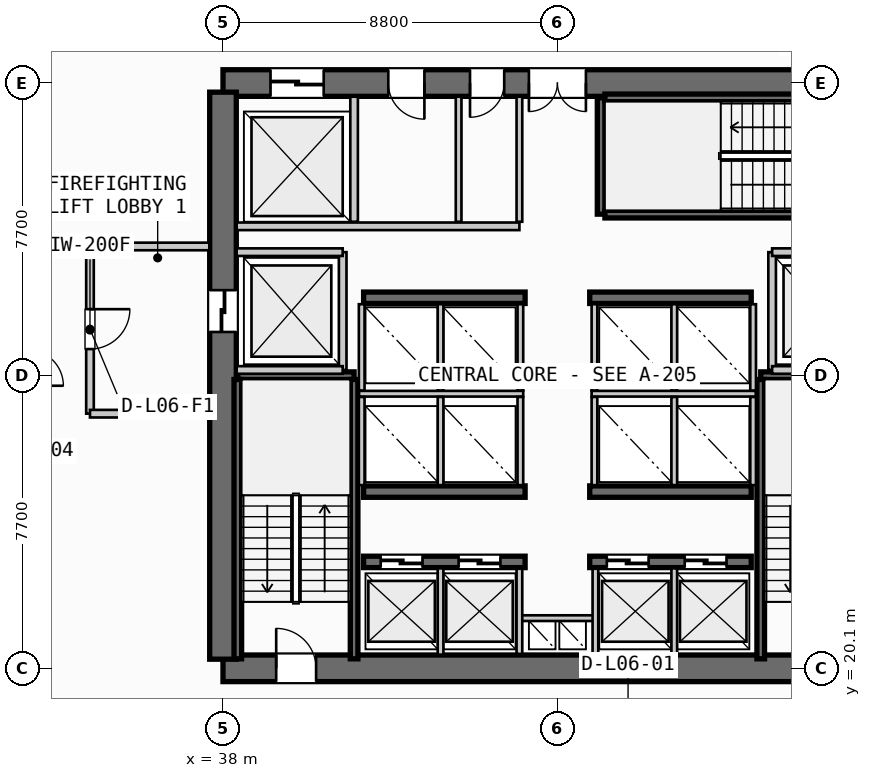
"""IFC4 building model, lengths in metres.
Left out: names, types, materials, properties, quantities, classifications, styles, units other than length and angle.
Written with IfcOpenShell. Run it as: python <this file> out.ifc"""

import sys

from ifc_helpers import new_model, si_unit, direction, frame, frame_2d, origin, place, context, subcontext, project, spatial, rectangle, extrude, source, transform, mapped, element, fill, save


model = new_model("IFC4")
c1 = context("Model", 3, precision=1e-05, world=origin(), true_north=direction((0.0, 1.0)))
c2 = subcontext(c1, "Body", "Model", "MODEL_VIEW")
j1 = project(units=[si_unit("LENGTHUNIT", "METRE"), si_unit("PLANEANGLEUNIT", "RADIAN")], contexts=[c1])
p1 = place(None, origin())
s1 = spatial("IfcSite", under=j1, at=p1, CompositionType="ELEMENT")
p2 = place(p1, origin())
s2 = spatial("IfcBuilding", under=s1, at=p2, CompositionType="ELEMENT")
p3 = place(p2, frame((0.0, 0.0, 29.6)))
s3 = spatial("IfcBuildingStorey", under=s2, at=p3, CompositionType="ELEMENT", Elevation=29.6)
p4 = place(p3, frame((38.0, 20.1, 0.0), z_axis=(0.0, 0.0, 1.0), x_axis=(1.0, 0.0, 0.0)))
e1 = element("IfcWall", 1, at=p4, inside=s3, PredefinedType="SHEAR", context=c2, shape_type="SweptSolid", body=[
    extrude(rectangle(XDim=17.6, YDim=0.7, at=frame_2d((8.8, 0.0))), origin(), (0.0, 0.0, 1.0), 3.55),
])
p5 = place(p4, frame((1.4, 0.0, 0.0)))
e2 = element("IfcOpeningElement", 2, at=p5, cuts=e1, PredefinedType="OPENING", context=c2, shape_type="SweptSolid", body=[
    extrude(rectangle(XDim=1.05, YDim=2.15, at=frame_2d((0.525, 1.075))), frame((0.0, 0.36, 0.0), z_axis=(0.0, -1.0, 0.0), x_axis=(1.0, 0.0, 0.0)), (0.0, 0.0, 1.0), 0.72),
])
p6 = place(p4, frame((15.15, 0.0, 0.0)))
e3 = element("IfcOpeningElement", 3, at=p6, cuts=e1, PredefinedType="OPENING", context=c2, shape_type="SweptSolid", body=[
    extrude(rectangle(XDim=1.05, YDim=2.15, at=frame_2d((0.525, 1.075))), frame((0.0, 0.36, 0.0), z_axis=(0.0, -1.0, 0.0), x_axis=(1.0, 0.0, 0.0)), (0.0, 0.0, 1.0), 0.72),
])
p7 = place(p3, frame((55.6, 35.5, 0.0), z_axis=(0.0, 0.0, 1.0), x_axis=(-1.0, 0.0, 0.0)))
e4 = element("IfcWall", 4, at=p7, inside=s3, PredefinedType="SHEAR", context=c2, shape_type="SweptSolid", body=[
    extrude(rectangle(XDim=17.6, YDim=0.7, at=frame_2d((8.8, 0.0))), origin(), (0.0, 0.0, 1.0), 3.55),
])
p8 = place(p7, frame((8.05, 0.0, 0.0)))
e5 = element("IfcOpeningElement", 5, at=p8, cuts=e4, PredefinedType="OPENING", context=c2, shape_type="SweptSolid", body=[
    extrude(rectangle(XDim=1.5, YDim=2.2, at=frame_2d((0.75, 1.1))), frame((0.0, 0.36, 0.0), z_axis=(0.0, -1.0, 0.0), x_axis=(1.0, 0.0, 0.0)), (0.0, 0.0, 1.0), 0.72),
])
p9 = place(p7, frame((14.95, 0.0, 0.0)))
e6 = element("IfcOpeningElement", 6, at=p9, cuts=e4, PredefinedType="OPENING", context=c2, shape_type="SweptSolid", body=[
    extrude(rectangle(XDim=1.4, YDim=2.3, at=frame_2d((0.7, 1.15))), frame((0.0, 0.36, 0.0), z_axis=(0.0, -1.0, 0.0), x_axis=(1.0, 0.0, 0.0)), (0.0, 0.0, 1.0), 0.72),
])
p10 = place(p7, frame((12.3, 0.0, 0.0)))
e7 = element("IfcOpeningElement", 7, at=p10, cuts=e4, PredefinedType="OPENING", context=c2, shape_type="SweptSolid", body=[
    extrude(rectangle(XDim=0.95, YDim=2.15, at=frame_2d((0.475, 1.075))), frame((0.0, 0.36, 0.0), z_axis=(0.0, -1.0, 0.0), x_axis=(1.0, 0.0, 0.0)), (0.0, 0.0, 1.0), 0.72),
])
p11 = place(p7, frame((10.2, 0.0, 0.0)))
e8 = element("IfcOpeningElement", 8, at=p11, cuts=e4, PredefinedType="OPENING", context=c2, shape_type="SweptSolid", body=[
    extrude(rectangle(XDim=0.9, YDim=2.15, at=frame_2d((0.45, 1.075))), frame((0.0, 0.36, 0.0), z_axis=(0.0, -1.0, 0.0), x_axis=(1.0, 0.0, 0.0)), (0.0, 0.0, 1.0), 0.72),
])
p12 = place(p3, frame((38.0, 35.26, 0.0), z_axis=(0.0, 0.0, 1.0), x_axis=(0.0, -1.0, 0.0)))
e9 = element("IfcWall", 9, at=p12, inside=s3, PredefinedType="SHEAR", context=c2, shape_type="SweptSolid", body=[
    extrude(rectangle(XDim=14.92, YDim=0.7, at=frame_2d((7.46, 0.0))), origin(), (0.0, 0.0, 1.0), 3.55),
])
p13 = place(p12, frame((5.21, 0.0, 0.0)))
e10 = element("IfcOpeningElement", 10, at=p13, cuts=e9, PredefinedType="OPENING", context=c2, shape_type="SweptSolid", body=[
    extrude(rectangle(XDim=1.1, YDim=2.2, at=frame_2d((0.55, 1.1))), frame((0.0, 0.36, 0.0), z_axis=(0.0, -1.0, 0.0), x_axis=(1.0, 0.0, 0.0)), (0.0, 0.0, 1.0), 0.72),
])
p14 = place(p3, frame((41.7, 22.9, 0.0), z_axis=(0.0, 0.0, 1.0), x_axis=(1.0, 0.0, 0.0)))
e11 = element("IfcWall", 11, at=p14, inside=s3, PredefinedType="SHEAR", context=c2, shape_type="SweptSolid", body=[
    extrude(rectangle(XDim=4.25, YDim=0.3, at=frame_2d((2.125, 0.0))), origin(), (0.0, 0.0, 1.0), 3.55),
])
p15 = place(p14, frame((0.45, 0.0, 0.0)))
e12 = element("IfcOpeningElement", 12, at=p15, cuts=e11, PredefinedType="OPENING", context=c2, shape_type="SweptSolid", body=[
    extrude(rectangle(XDim=1.1, YDim=2.2, at=frame_2d((0.55, 1.1))), frame((0.0, 0.16, 0.0), z_axis=(0.0, -1.0, 0.0), x_axis=(1.0, 0.0, 0.0)), (0.0, 0.0, 1.0), 0.32),
])
p16 = place(p14, frame((2.5, 0.0, 0.0)))
e13 = element("IfcOpeningElement", 13, at=p16, cuts=e11, PredefinedType="OPENING", context=c2, shape_type="SweptSolid", body=[
    extrude(rectangle(XDim=1.1, YDim=2.2, at=frame_2d((0.55, 1.1))), frame((0.0, 0.16, 0.0), z_axis=(0.0, -1.0, 0.0), x_axis=(1.0, 0.0, 0.0)), (0.0, 0.0, 1.0), 0.32),
])
p17 = place(p3, frame((47.65, 22.9, 0.0), z_axis=(0.0, 0.0, 1.0), x_axis=(1.0, 0.0, 0.0)))
e14 = element("IfcWall", 14, at=p17, inside=s3, PredefinedType="SHEAR", context=c2, shape_type="SweptSolid", body=[
    extrude(rectangle(XDim=4.25, YDim=0.3, at=frame_2d((2.125, 0.0))), origin(), (0.0, 0.0, 1.0), 3.55),
])
p18 = place(p17, frame((0.45, 0.0, 0.0)))
e15 = element("IfcOpeningElement", 15, at=p18, cuts=e14, PredefinedType="OPENING", context=c2, shape_type="SweptSolid", body=[
    extrude(rectangle(XDim=1.1, YDim=2.2, at=frame_2d((0.55, 1.1))), frame((0.0, 0.16, 0.0), z_axis=(0.0, -1.0, 0.0), x_axis=(1.0, 0.0, 0.0)), (0.0, 0.0, 1.0), 0.32),
])
p19 = place(p17, frame((2.5, 0.0, 0.0)))
e16 = element("IfcOpeningElement", 16, at=p19, cuts=e14, PredefinedType="OPENING", context=c2, shape_type="SweptSolid", body=[
    extrude(rectangle(XDim=1.1, YDim=2.2, at=frame_2d((0.55, 1.1))), frame((0.0, 0.16, 0.0), z_axis=(0.0, -1.0, 0.0), x_axis=(1.0, 0.0, 0.0)), (0.0, 0.0, 1.0), 0.32),
])
for number, where, z_axis, x_axis in (
    (17, (41.7, 24.75, 0.0), (0.0, 0.0, 1.0), (1.0, 0.0, 0.0)),
    (18, (47.65, 24.75, 0.0), (0.0, 0.0, 1.0), (1.0, 0.0, 0.0)),
    (19, (41.7, 29.85, 0.0), (0.0, 0.0, 1.0), (1.0, 0.0, 0.0)),
    (20, (47.65, 29.85, 0.0), (0.0, 0.0, 1.0), (1.0, 0.0, 0.0)),
):
    element("IfcWall", number, at=place(p3, frame(where, z_axis=z_axis, x_axis=x_axis)), inside=s3, PredefinedType="SHEAR", context=c2, shape_type="SweptSolid", body=[
        extrude(rectangle(XDim=4.25, YDim=0.3, at=frame_2d((2.125, 0.0))), origin(), (0.0, 0.0, 1.0), 3.55),
    ])
p20 = place(p3, frame((38.39, 27.8, 0.0), z_axis=(0.0, 0.0, 1.0), x_axis=(1.0, 0.0, 0.0)))
e21 = element("IfcWall", 21, at=p20, inside=s3, PredefinedType="SHEAR", context=c2, shape_type="SweptSolid", body=[
    extrude(rectangle(XDim=3.06, YDim=0.2, at=frame_2d((1.53, 0.0))), origin(), (0.0, 0.0, 1.0), 3.55),
])
for number, where, z_axis, x_axis in (
    (22, (41.45, 27.7, 0.0), (0.0, 0.0, 1.0), (0.0, -1.0, 0.0)),
    (23, (38.39, 20.35, 0.0), (0.0, 0.0, 1.0), (0.0, 1.0, 0.0)),
):
    element("IfcWall", number, at=place(p3, frame(where, z_axis=z_axis, x_axis=x_axis)), inside=s3, PredefinedType="SHEAR", context=c2, shape_type="SweptSolid", body=[
        extrude(rectangle(XDim=7.35, YDim=0.2, at=frame_2d((3.675, 0.0))), origin(), (0.0, 0.0, 1.0), 3.55),
    ])
p21 = place(p3, frame((52.15, 27.8, 0.0), z_axis=(0.0, 0.0, 1.0), x_axis=(1.0, 0.0, 0.0)))
e24 = element("IfcWall", 24, at=p21, inside=s3, PredefinedType="SHEAR", context=c2, shape_type="SweptSolid", body=[
    extrude(rectangle(XDim=3.06, YDim=0.2, at=frame_2d((1.53, 0.0))), origin(), (0.0, 0.0, 1.0), 3.55),
])
p22 = place(p3, frame((52.15, 20.35, 0.0), z_axis=(0.0, 0.0, 1.0), x_axis=(0.0, 1.0, 0.0)))
e25 = element("IfcWall", 25, at=p22, inside=s3, PredefinedType="SHEAR", context=c2, shape_type="SweptSolid", body=[
    extrude(rectangle(XDim=7.35, YDim=0.2, at=frame_2d((3.675, 0.0))), origin(), (0.0, 0.0, 1.0), 3.55),
])
p23 = place(p3, frame((47.95, 32.05, 0.0), z_axis=(0.0, 0.0, 1.0), x_axis=(0.0, 1.0, 0.0)))
e26 = element("IfcWall", 26, at=p23, inside=s3, PredefinedType="SHEAR", context=c2, shape_type="SweptSolid", body=[
    extrude(rectangle(XDim=3.06, YDim=0.2, at=frame_2d((1.53, 0.0))), origin(), (0.0, 0.0, 1.0), 3.55),
])
for number, where, z_axis, x_axis in (
    (27, (48.05, 35.11, 0.0), (0.0, 0.0, 1.0), (1.0, 0.0, 0.0)),
    (28, (55.4, 32.05, 0.0), (0.0, 0.0, 1.0), (-1.0, 0.0, 0.0)),
):
    element("IfcWall", number, at=place(p3, frame(where, z_axis=z_axis, x_axis=x_axis)), inside=s3, PredefinedType="SHEAR", context=c2, shape_type="SweptSolid", body=[
        extrude(rectangle(XDim=7.35, YDim=0.2, at=frame_2d((3.675, 0.0))), origin(), (0.0, 0.0, 1.0), 3.55),
    ])
p24 = place(p3, frame((45.8, 21.42, 0.0), z_axis=(0.0, 0.0, 1.0), x_axis=(1.0, 0.0, 0.0)))
e29 = element("IfcWall", 29, at=p24, inside=s3, PredefinedType="PARTITIONING", context=c2, shape_type="SweptSolid", body=[
    extrude(rectangle(XDim=2.0, YDim=0.15, at=frame_2d((1.0, 0.0))), origin(), (0.0, 0.0, 1.0), 2.925),
])
for number, where, z_axis, x_axis in (
    (30, (45.8, 20.48, 0.0), (0.0, 0.0, 1.0), (0.0, 1.0, 0.0)),
    (31, (47.8, 20.48, 0.0), (0.0, 0.0, 1.0), (0.0, 1.0, 0.0)),
):
    element("IfcWall", number, at=place(p3, frame(where, z_axis=z_axis, x_axis=x_axis)), inside=s3, PredefinedType="PARTITIONING", context=c2, shape_type="SweptSolid", body=[
        extrude(rectangle(XDim=2.24, YDim=0.15, at=frame_2d((1.12, 0.0))), origin(), (0.0, 0.0, 1.0), 2.925),
    ])
p25 = place(p3, frame((41.15, 27.95, 0.0), z_axis=(0.0, 0.0, 1.0), x_axis=(0.0, 1.0, 0.0)))
e32 = element("IfcWall", 32, at=p25, inside=s3, PredefinedType="PARTITIONING", context=c2, shape_type="SweptSolid", body=[
    extrude(rectangle(XDim=3.1, YDim=0.2, at=frame_2d((1.55, 0.0))), origin(), (0.0, 0.0, 1.0), 2.925),
])
for number, where, z_axis, x_axis in (
    (33, (38.36, 27.95, 0.0), (0.0, 0.0, 1.0), (1.0, 0.0, 0.0)),
    (34, (38.36, 31.05, 0.0), (0.0, 0.0, 1.0), (1.0, 0.0, 0.0)),
):
    element("IfcWall", number, at=place(p3, frame(where, z_axis=z_axis, x_axis=x_axis)), inside=s3, PredefinedType="PARTITIONING", context=c2, shape_type="SweptSolid", body=[
        extrude(rectangle(XDim=2.79, YDim=0.2, at=frame_2d((1.395, 0.0))), origin(), (0.0, 0.0, 1.0), 2.925),
    ])
p26 = place(p3, frame((34.5, 31.2, 0.0), z_axis=(0.0, 0.0, 1.0), x_axis=(0.0, -1.0, 0.0)))
e35 = element("IfcWall", 35, at=p26, inside=s3, PredefinedType="PARTITIONING", context=c2, shape_type="SweptSolid", body=[
    extrude(rectangle(XDim=4.4, YDim=0.2, at=frame_2d((2.2, 0.0))), origin(), (0.0, 0.0, 1.0), 2.925),
])
p27 = place(p26, frame((1.65, 0.0, 0.0)))
e36 = element("IfcOpeningElement", 36, at=p27, cuts=e35, PredefinedType="OPENING", context=c2, shape_type="SweptSolid", body=[
    extrude(rectangle(XDim=1.05, YDim=2.15, at=frame_2d((0.525, 1.075))), frame((0.0, 0.11, 0.0), z_axis=(0.0, -1.0, 0.0), x_axis=(1.0, 0.0, 0.0)), (0.0, 0.0, 1.0), 0.22),
])
for number, where, z_axis, x_axis in (
    (37, (34.5, 26.8, 0.0), (0.0, 0.0, 1.0), (1.0, 0.0, 0.0)),
    (38, (34.5, 31.2, 0.0), (0.0, 0.0, 1.0), (1.0, 0.0, 0.0)),
):
    element("IfcWall", number, at=place(p3, frame(where, z_axis=z_axis, x_axis=x_axis)), inside=s3, PredefinedType="PARTITIONING", context=c2, shape_type="SweptSolid", body=[
        extrude(rectangle(XDim=3.14, YDim=0.2, at=frame_2d((1.57, 0.0))), origin(), (0.0, 0.0, 1.0), 2.925),
    ])
p28 = place(p3, frame((52.45, 27.95, 0.0), z_axis=(0.0, 0.0, 1.0), x_axis=(0.0, 1.0, 0.0)))
e39 = element("IfcWall", 39, at=p28, inside=s3, PredefinedType="PARTITIONING", context=c2, shape_type="SweptSolid", body=[
    extrude(rectangle(XDim=3.1, YDim=0.2, at=frame_2d((1.55, 0.0))), origin(), (0.0, 0.0, 1.0), 2.925),
])
for number, where, z_axis, x_axis in (
    (40, (52.45, 27.95, 0.0), (0.0, 0.0, 1.0), (1.0, 0.0, 0.0)),
    (41, (52.45, 31.05, 0.0), (0.0, 0.0, 1.0), (1.0, 0.0, 0.0)),
):
    element("IfcWall", number, at=place(p3, frame(where, z_axis=z_axis, x_axis=x_axis)), inside=s3, PredefinedType="PARTITIONING", context=c2, shape_type="SweptSolid", body=[
        extrude(rectangle(XDim=2.79, YDim=0.2, at=frame_2d((1.395, 0.0))), origin(), (0.0, 0.0, 1.0), 2.925),
    ])
for number, where, z_axis, x_axis in (
    (42, (43.725, 20.46, 0.0), (0.0, 0.0, 1.0), (0.0, 1.0, 0.0)),
    (43, (49.875, 20.46, 0.0), (0.0, 0.0, 1.0), (0.0, 1.0, 0.0)),
):
    element("IfcWall", number, at=place(p3, frame(where, z_axis=z_axis, x_axis=x_axis)), inside=s3, PredefinedType="PARTITIONING", context=c2, shape_type="SweptSolid", body=[
        extrude(rectangle(XDim=2.27, YDim=0.15, at=frame_2d((1.135, 0.0))), origin(), (0.0, 0.0, 1.0), 2.925),
    ])
p29 = place(p3, frame((41.58, 27.325, 0.0), z_axis=(0.0, 0.0, 1.0), x_axis=(1.0, 0.0, 0.0)))
e44 = element("IfcWall", 44, at=p29, inside=s3, PredefinedType="PARTITIONING", context=c2, shape_type="SweptSolid", body=[
    extrude(rectangle(XDim=4.32, YDim=0.15, at=frame_2d((2.16, 0.0))), origin(), (0.0, 0.0, 1.0), 2.925),
])
p30 = place(p3, frame((47.7, 27.325, 0.0), z_axis=(0.0, 0.0, 1.0), x_axis=(1.0, 0.0, 0.0)))
e45 = element("IfcWall", 45, at=p30, inside=s3, PredefinedType="PARTITIONING", context=c2, shape_type="SweptSolid", body=[
    extrude(rectangle(XDim=4.32, YDim=0.15, at=frame_2d((2.16, 0.0))), origin(), (0.0, 0.0, 1.0), 2.925),
])
for number, where, z_axis, x_axis in (
    (46, (41.65, 24.92, 0.0), (0.0, 0.0, 1.0), (0.0, 1.0, 0.0)),
    (47, (43.725, 24.92, 0.0), (0.0, 0.0, 1.0), (0.0, 1.0, 0.0)),
    (48, (45.825, 24.92, 0.0), (0.0, 0.0, 1.0), (0.0, 1.0, 0.0)),
    (49, (47.775, 24.92, 0.0), (0.0, 0.0, 1.0), (0.0, 1.0, 0.0)),
    (50, (49.875, 24.92, 0.0), (0.0, 0.0, 1.0), (0.0, 1.0, 0.0)),
    (51, (51.95, 24.92, 0.0), (0.0, 0.0, 1.0), (0.0, 1.0, 0.0)),
):
    element("IfcWall", number, at=place(p3, frame(where, z_axis=z_axis, x_axis=x_axis)), inside=s3, PredefinedType="PARTITIONING", context=c2, shape_type="SweptSolid", body=[
        extrude(rectangle(XDim=2.32, YDim=0.15, at=frame_2d((1.16, 0.0))), origin(), (0.0, 0.0, 1.0), 2.925),
    ])
for number, where, z_axis, x_axis in (
    (52, (41.65, 27.41, 0.0), (0.0, 0.0, 1.0), (0.0, 1.0, 0.0)),
    (53, (43.725, 27.41, 0.0), (0.0, 0.0, 1.0), (0.0, 1.0, 0.0)),
    (54, (45.825, 27.41, 0.0), (0.0, 0.0, 1.0), (0.0, 1.0, 0.0)),
    (55, (47.775, 27.41, 0.0), (0.0, 0.0, 1.0), (0.0, 1.0, 0.0)),
    (56, (49.875, 27.41, 0.0), (0.0, 0.0, 1.0), (0.0, 1.0, 0.0)),
    (57, (51.95, 27.41, 0.0), (0.0, 0.0, 1.0), (0.0, 1.0, 0.0)),
):
    element("IfcWall", number, at=place(p3, frame(where, z_axis=z_axis, x_axis=x_axis)), inside=s3, PredefinedType="PARTITIONING", context=c2, shape_type="SweptSolid", body=[
        extrude(rectangle(XDim=2.27, YDim=0.15, at=frame_2d((1.135, 0.0))), origin(), (0.0, 0.0, 1.0), 2.925),
    ])
p31 = place(p3, frame((41.45, 31.85, 0.0), z_axis=(0.0, 0.0, 1.0), x_axis=(0.0, 1.0, 0.0)))
e58 = element("IfcWall", 58, at=p31, inside=s3, PredefinedType="PARTITIONING", context=c2, shape_type="SweptSolid", body=[
    extrude(rectangle(XDim=3.29, YDim=0.2, at=frame_2d((1.645, 0.0))), origin(), (0.0, 0.0, 1.0), 2.925),
])
p32 = place(p3, frame((38.36, 31.73, 0.0), z_axis=(0.0, 0.0, 1.0), x_axis=(1.0, 0.0, 0.0)))
e59 = element("IfcWall", 59, at=p32, inside=s3, PredefinedType="PARTITIONING", context=c2, shape_type="SweptSolid", body=[
    extrude(rectangle(XDim=7.44, YDim=0.2, at=frame_2d((3.72, 0.0))), origin(), (0.0, 0.0, 1.0), 2.925),
])
p33 = place(p3, frame((45.8, 31.85, 0.0), z_axis=(0.0, 0.0, 1.0), x_axis=(0.0, 1.0, 0.0)))
e60 = element("IfcWall", 60, at=p33, inside=s3, PredefinedType="PARTITIONING", context=c2, shape_type="SweptSolid", body=[
    extrude(rectangle(XDim=3.29, YDim=0.15, at=frame_2d((1.645, 0.0))), origin(), (0.0, 0.0, 1.0), 2.925),
])
p34 = place(p3, frame((44.2, 31.85, 0.0), z_axis=(0.0, 0.0, 1.0), x_axis=(0.0, 1.0, 0.0)))
e61 = element("IfcWall", 61, at=p34, inside=s3, PredefinedType="PLUMBINGWALL", context=c2, shape_type="SweptSolid", body=[
    extrude(rectangle(XDim=3.29, YDim=0.15, at=frame_2d((1.645, 0.0))), origin(), (0.0, 0.0, 1.0), 2.925),
])
m1 = source(origin(), c2, "Body", "SweptSolid", [
    extrude(rectangle(XDim=1.05, YDim=2.15, at=frame_2d((0.525, 1.075))), frame((0.0, 0.025, 0.0), z_axis=(0.0, -1.0, 0.0), x_axis=(1.0, 0.0, 0.0)), (0.0, 0.0, 1.0), 0.05),
])
p35 = place(p5, origin())
e62 = element("IfcDoor", 62, at=p35, inside=s3, OperationType="SINGLE_SWING_LEFT", PredefinedType="DOOR", context=c2, shape_type="MappedRepresentation", body=[
    mapped(m1, transform((0.0, 0.0, 0.0), scale=1.0)),
])
fill(e2, e62)
m2 = source(origin(), c2, "Body", "SweptSolid", [
    extrude(rectangle(XDim=1.5, YDim=2.2, at=frame_2d((0.75, 1.1))), frame((0.0, 0.025, 0.0), z_axis=(0.0, -1.0, 0.0), x_axis=(1.0, 0.0, 0.0)), (0.0, 0.0, 1.0), 0.05),
])
p36 = place(p8, origin())
e63 = element("IfcDoor", 63, at=p36, inside=s3, OperationType="DOUBLE_DOOR_SINGLE_SWING", PredefinedType="DOOR", context=c2, shape_type="MappedRepresentation", body=[
    mapped(m2, transform((0.0, 0.0, 0.0), scale=1.0)),
])
fill(e5, e63)
m3 = source(origin(), c2, "Body", "SweptSolid", [
    extrude(rectangle(XDim=1.1, YDim=2.2, at=frame_2d((0.55, 1.1))), frame((0.0, 0.025, 0.0), z_axis=(0.0, -1.0, 0.0), x_axis=(1.0, 0.0, 0.0)), (0.0, 0.0, 1.0), 0.05),
])
p37 = place(p13, origin())
e64 = element("IfcDoor", 64, at=p37, inside=s3, OperationType="SLIDING_TO_LEFT", PredefinedType="DOOR", context=c2, shape_type="MappedRepresentation", body=[
    mapped(m3, transform((0.0, 0.0, 0.0), scale=1.0)),
])
fill(e10, e64)
p38 = place(p15, origin())
e65 = element("IfcDoor", 65, at=p38, inside=s3, OperationType="SLIDING_TO_LEFT", PredefinedType="DOOR", context=c2, shape_type="MappedRepresentation", body=[
    mapped(m3, transform((0.0, 0.0, 0.0), scale=1.0)),
])
fill(e12, e65)
p39 = place(p16, origin())
e66 = element("IfcDoor", 66, at=p39, inside=s3, OperationType="SLIDING_TO_LEFT", PredefinedType="DOOR", context=c2, shape_type="MappedRepresentation", body=[
    mapped(m3, transform((0.0, 0.0, 0.0), scale=1.0)),
])
fill(e13, e66)
p40 = place(p18, origin())
e67 = element("IfcDoor", 67, at=p40, inside=s3, OperationType="SLIDING_TO_LEFT", PredefinedType="DOOR", context=c2, shape_type="MappedRepresentation", body=[
    mapped(m3, transform((0.0, 0.0, 0.0), scale=1.0)),
])
fill(e15, e67)
p41 = place(p19, origin())
e68 = element("IfcDoor", 68, at=p41, inside=s3, OperationType="SLIDING_TO_LEFT", PredefinedType="DOOR", context=c2, shape_type="MappedRepresentation", body=[
    mapped(m3, transform((0.0, 0.0, 0.0), scale=1.0)),
])
fill(e16, e68)
m4 = source(origin(), c2, "Body", "SweptSolid", [
    extrude(rectangle(XDim=1.4, YDim=2.3, at=frame_2d((0.7, 1.15))), frame((0.0, 0.025, 0.0), z_axis=(0.0, -1.0, 0.0), x_axis=(1.0, 0.0, 0.0)), (0.0, 0.0, 1.0), 0.05),
])
p42 = place(p9, origin())
e69 = element("IfcDoor", 69, at=p42, inside=s3, OperationType="SLIDING_TO_RIGHT", PredefinedType="DOOR", context=c2, shape_type="MappedRepresentation", body=[
    mapped(m4, transform((0.0, 0.0, 0.0), scale=1.0)),
])
fill(e6, e69)
m5 = source(origin(), c2, "Body", "SweptSolid", [
    extrude(rectangle(XDim=0.95, YDim=2.15, at=frame_2d((0.475, 1.075))), frame((0.0, 0.025, 0.0), z_axis=(0.0, -1.0, 0.0), x_axis=(1.0, 0.0, 0.0)), (0.0, 0.0, 1.0), 0.05),
])
p43 = place(p10, origin())
e70 = element("IfcDoor", 70, at=p43, inside=s3, OperationType="SINGLE_SWING_LEFT", PredefinedType="DOOR", context=c2, shape_type="MappedRepresentation", body=[
    mapped(m5, transform((0.0, 0.0, 0.0), scale=1.0)),
])
fill(e7, e70)
m6 = source(origin(), c2, "Body", "SweptSolid", [
    extrude(rectangle(XDim=0.9, YDim=2.15, at=frame_2d((0.45, 1.075))), frame((0.0, 0.025, 0.0), z_axis=(0.0, -1.0, 0.0), x_axis=(1.0, 0.0, 0.0)), (0.0, 0.0, 1.0), 0.05),
])
p44 = place(p11, origin())
e71 = element("IfcDoor", 71, at=p44, inside=s3, OperationType="SINGLE_SWING_RIGHT", PredefinedType="DOOR", context=c2, shape_type="MappedRepresentation", body=[
    mapped(m6, transform((0.0, 0.0, 0.0), scale=1.0)),
])
fill(e8, e71)
p45 = place(p27, origin())
e72 = element("IfcDoor", 72, at=p45, inside=s3, OperationType="SINGLE_SWING_LEFT", PredefinedType="DOOR", context=c2, shape_type="MappedRepresentation", body=[
    mapped(m1, transform((0.0, 0.0, 0.0), scale=1.0)),
])
fill(e36, e72)
save(model, sys.argv[1])
